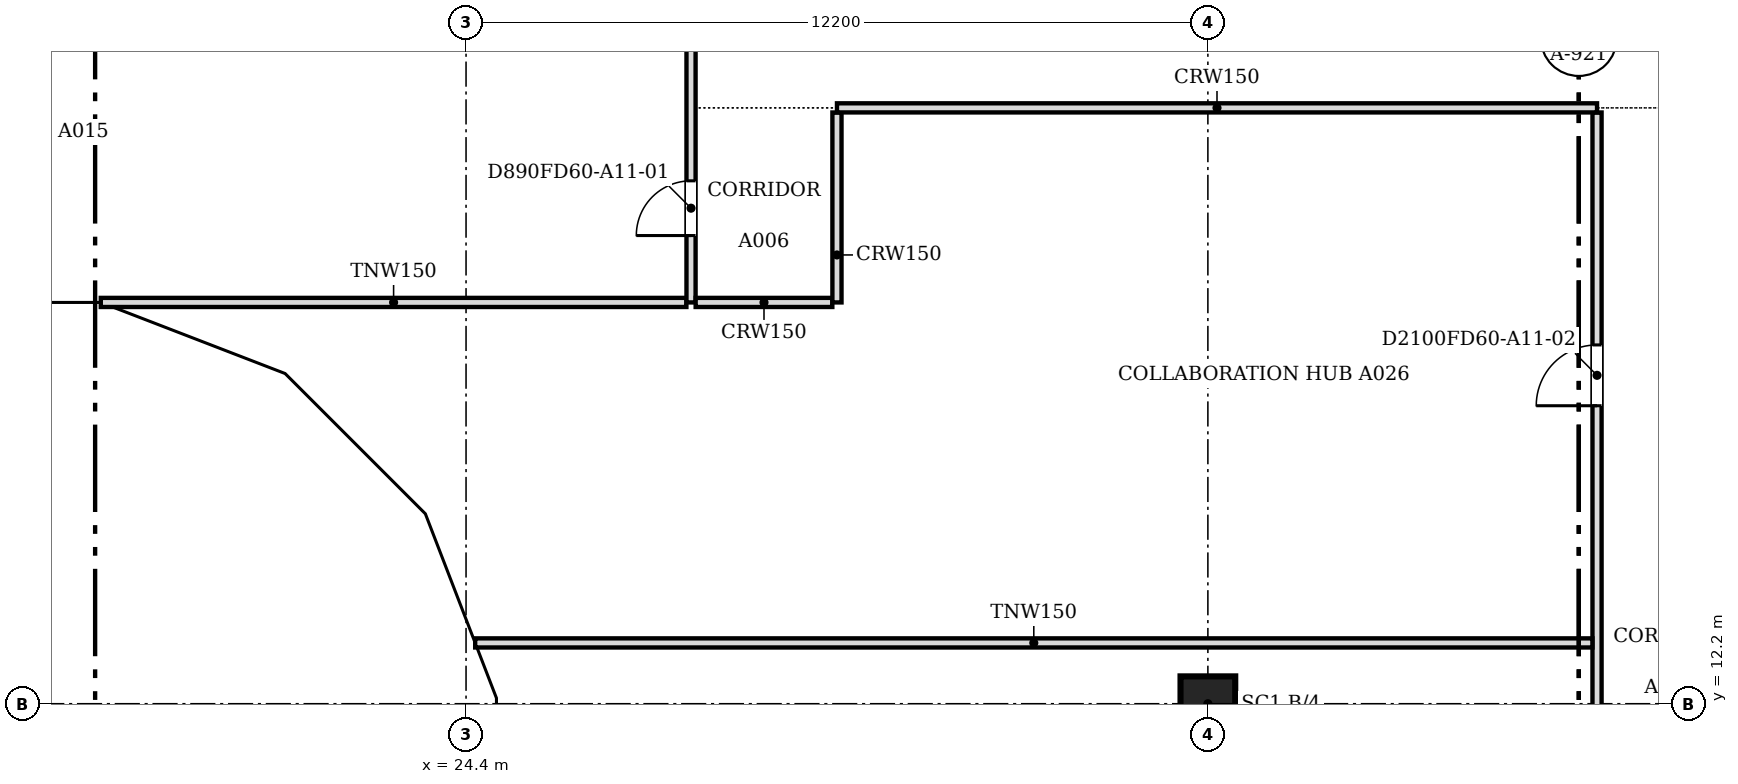
"""IFC4 building model, lengths in metres.
Left out: names, types, materials, properties, quantities, classifications, styles, units other than length and angle.
Written with IfcOpenShell. Run it as: python <this file> out.ifc"""

import sys

from ifc_helpers import new_model, si_unit, direction, frame, frame_2d, origin, origin_2d, place, context, subcontext, project, spatial, polyline, rectangle, outline, extrude, faceted_brep, source, transform, mapped, element, fill, save


model = new_model("IFC4")
c1 = context("Model", 3, precision=1e-05, world=origin(), true_north=direction((0.0, 1.0)))
c2 = subcontext(c1, "Body", "Model", "MODEL_VIEW")
j1 = project(units=[si_unit("LENGTHUNIT", "METRE"), si_unit("PLANEANGLEUNIT", "RADIAN")], contexts=[c1])
p1 = place(None, origin())
s1 = spatial("IfcSite", under=j1, at=p1, CompositionType="ELEMENT")
p2 = place(p1, origin())
s2 = spatial("IfcBuilding", under=s1, at=p2, CompositionType="ELEMENT")
p3 = place(p2, frame((0.0, 0.0, 131.6)))
s3 = spatial("IfcBuildingStorey", under=s2, at=p3, CompositionType="ELEMENT", Elevation=131.6)
p4 = place(p3, frame((36.6, 12.2, 0.0), z_axis=(0.0, 0.0, 1.0), x_axis=(1.0, 0.0, 0.0)))
e1 = element("IfcColumn", 1, at=p4, inside=s3, PredefinedType="COLUMN", context=c2, shape_type="SweptSolid", body=[
    extrude(rectangle(XDim=0.9, YDim=0.9, at=origin_2d()), origin(), (0.0, 0.0, 1.0), 3.6),
])
m1 = source(origin(), c2, "Body", "Brep", [
    faceted_brep([(3.05, -0.25, 0.0), (6.1, -0.25, 3.743), (6.1, -0.25, 3.857), (3.05, -0.25, 7.6), (0.0, -0.25, 3.8), (0.0, 0.25, 3.8), (3.05, 0.25, 7.6), (6.146, 0.25, 3.8), (3.05, 0.25, 0.0), (6.146, -0.0, 3.8)], [[[0, 1, 2, 3, 4]], [[5, 6, 7, 8]], [[8, 7, 9, 1, 0]], [[7, 6, 3, 2, 9]], [[6, 5, 4, 3]], [[5, 8, 0, 4]], [[1, 9, 2]]]),
])
p5 = place(p3, frame((12.2, 18.55, -3.8), z_axis=(0.0, 0.0, 1.0), x_axis=(1.0, 0.0, 0.0)))
e2 = element("IfcWall", 2, at=p5, inside=s3, PredefinedType="SOLIDWALL", context=c2, shape_type="MappedRepresentation", body=[
    mapped(m1, transform((0.0, 0.0, 0.0), scale=1.0)),
])
m2 = source(origin(), c2, "Body", "SweptSolid", [
    extrude(outline(polyline([(3.052, 0.397), (5.824, 3.8), (3.052, 7.202), (0.321, 3.8), (3.052, 0.397)])), frame((0.0, 0.26, 0.0), z_axis=(0.0, -1.0, 0.0), x_axis=(1.0, 0.0, 0.0)), (0.0, 0.0, 1.0), 0.52),
])
p6 = place(p5, origin())
e3 = element("IfcOpeningElement", 3, at=p6, cuts=e2, PredefinedType="OPENING", context=c2, shape_type="MappedRepresentation", body=[
    mapped(m2, transform((0.0, 0.0, 0.0), scale=1.0)),
])
m3 = source(origin(), c2, "Body", "Brep", [
    faceted_brep([(3.096, -0.25, 7.536), (0.047, -0.25, 3.856), (0.047, -0.25, 3.744), (3.096, -0.25, 0.064), (0.0, 0.25, 3.8), (3.149, 0.25, 7.6), (3.202, 0.25, 7.536), (3.202, 0.25, 0.064), (3.149, 0.25, 0.0), (3.149, -0.0, 0.0), (3.149, -0.0, 7.6), (0.0, 0.0, 3.8)], [[[0, 1, 2, 3]], [[4, 5, 6, 7, 8]], [[8, 7, 9]], [[6, 5, 10]], [[5, 4, 11, 1, 0, 10]], [[4, 8, 9, 3, 2, 11]], [[2, 1, 11]], [[3, 9, 7, 6, 10, 0]]]),
])
p7 = place(p3, frame((18.346, 18.55, -3.8), z_axis=(0.0, 0.0, 1.0), x_axis=(0.932985567668, -0.359913782069, 0.0)))
e4 = element("IfcWall", 4, at=p7, inside=s3, PredefinedType="SOLIDWALL", context=c2, shape_type="MappedRepresentation", body=[
    mapped(m3, transform((0.0, 0.0, 0.0), scale=1.0)),
])
m4 = source(origin(), c2, "Body", "SweptSolid", [
    extrude(outline(polyline([(2.949, 6.967), (0.325, 3.8), (2.949, 0.633), (2.949, 6.967)])), frame((0.0, 0.26, 0.0), z_axis=(0.0, -1.0, 0.0), x_axis=(1.0, 0.0, 0.0)), (0.0, 0.0, 1.0), 0.52),
])
p8 = place(p7, origin())
e5 = element("IfcOpeningElement", 5, at=p8, cuts=e4, PredefinedType="OPENING", context=c2, shape_type="MappedRepresentation", body=[
    mapped(m4, transform((0.0, 0.0, 0.0), scale=1.0)),
])
m5 = source(origin(), c2, "Body", "Brep", [
    faceted_brep([(0.106, -0.25, 0.064), (3.156, -0.25, 3.736), (3.156, -0.25, 3.864), (0.106, -0.25, 7.536), (0.0, 0.25, 7.536), (0.053, 0.25, 7.6), (3.209, 0.25, 3.8), (0.053, 0.25, 0.0), (0.0, 0.25, 0.064), (3.209, -0.0, 3.8), (0.053, 0.0, 0.0), (0.053, 0.0, 7.6)], [[[0, 1, 2, 3]], [[4, 5, 6, 7, 8]], [[7, 6, 9, 1, 0, 10]], [[6, 5, 11, 3, 2, 9]], [[5, 4, 11]], [[8, 7, 10]], [[8, 10, 0, 3, 11, 4]], [[1, 9, 2]]]),
])
p9 = place(p3, frame((21.248, 17.454, -3.8), z_axis=(0.0, 0.0, 1.0), x_axis=(0.707106781187, -0.707106781187, 0.0)))
e6 = element("IfcWall", 6, at=p9, inside=s3, PredefinedType="SOLIDWALL", context=c2, shape_type="MappedRepresentation", body=[
    mapped(m5, transform((0.0, 0.0, 0.0), scale=1.0)),
])
m6 = source(origin(), c2, "Body", "SweptSolid", [
    extrude(outline(polyline([(0.253, 0.632), (2.884, 3.8), (0.253, 6.968), (0.253, 0.632)])), frame((0.0, 0.26, 0.0), z_axis=(0.0, -1.0, 0.0), x_axis=(1.0, 0.0, 0.0)), (0.0, 0.0, 1.0), 0.52),
])
p10 = place(p9, origin())
e7 = element("IfcOpeningElement", 7, at=p10, cuts=e6, PredefinedType="OPENING", context=c2, shape_type="MappedRepresentation", body=[
    mapped(m6, transform((0.0, 0.0, 0.0), scale=1.0)),
])
m7 = source(origin(), c2, "Body", "Brep", [
    faceted_brep([(3.103, -0.25, 7.544), (0.053, -0.25, 3.864), (0.053, -0.25, 3.736), (3.103, -0.25, 0.056), (0.0, 0.25, 3.8), (3.149, 0.25, 7.6), (3.196, 0.25, 7.543), (3.196, 0.25, 0.057), (3.149, 0.25, 0.0), (3.149, -0.0, 0.0), (3.149, -0.0, 7.6), (0.0, 0.0, 3.8)], [[[0, 1, 2, 3]], [[4, 5, 6, 7, 8]], [[8, 7, 9]], [[6, 5, 10]], [[5, 4, 11, 1, 0, 10]], [[4, 8, 9, 3, 2, 11]], [[2, 1, 11]], [[3, 9, 7, 6, 10, 0]]]),
])
p11 = place(p3, frame((23.517, 15.185, -3.8), z_axis=(0.0, 0.0, 1.0), x_axis=(0.359864468756, -0.933004589553, 0.0)))
e8 = element("IfcWall", 8, at=p11, inside=s3, PredefinedType="SOLIDWALL", context=c2, shape_type="MappedRepresentation", body=[
    mapped(m7, transform((0.0, 0.0, 0.0), scale=1.0)),
])
p12 = place(p11, origin())
e9 = element("IfcOpeningElement", 9, at=p12, cuts=e8, PredefinedType="OPENING", context=c2, shape_type="MappedRepresentation", body=[
    mapped(m4, transform((0.0, 0.0, 0.0), scale=1.0)),
])
m8 = source(origin(), c2, "Body", "Brep", [
    faceted_brep([(0.093, -0.25, 0.057), (3.143, -0.25, 3.8), (0.093, -0.25, 7.543), (0.0, 0.25, 7.544), (0.047, 0.25, 7.6), (3.143, 0.25, 3.8), (0.047, 0.25, 0.0), (0.0, 0.25, 0.056), (0.047, 0.0, 0.0), (0.047, 0.0, 7.6)], [[[0, 1, 2]], [[3, 4, 5, 6, 7]], [[6, 5, 1, 0, 8]], [[5, 4, 9, 2, 1]], [[4, 3, 9]], [[7, 6, 8]], [[7, 8, 0, 2, 9, 3]]]),
])
p13 = place(p3, frame((24.65, 12.293, -3.8), z_axis=(0.0, 0.0, 1.0), x_axis=(0.0, -1.0, 0.0)))
e10 = element("IfcWall", 10, at=p13, inside=s3, PredefinedType="SOLIDWALL", context=c2, shape_type="MappedRepresentation", body=[
    mapped(m8, transform((0.0, 0.0, 0.0), scale=1.0)),
])
m9 = source(origin(), c2, "Body", "SweptSolid", [
    extrude(outline(polyline([(0.247, 0.641), (2.821, 3.8), (0.247, 6.959), (0.247, 0.641)])), frame((0.0, 0.26, 0.0), z_axis=(0.0, -1.0, 0.0), x_axis=(1.0, 0.0, 0.0)), (0.0, 0.0, 1.0), 0.52),
])
p14 = place(p13, origin())
e11 = element("IfcOpeningElement", 11, at=p14, cuts=e10, PredefinedType="OPENING", context=c2, shape_type="MappedRepresentation", body=[
    mapped(m9, transform((0.0, 0.0, 0.0), scale=1.0)),
])
p15 = place(p2, frame((0.0, 0.0, 135.4)))
s4 = spatial("IfcBuildingStorey", under=s2, at=p15, CompositionType="ELEMENT", Elevation=135.4)
m10 = source(origin(), c2, "Body", "Brep", [
    faceted_brep([(3.05, -0.25, 7.543), (0.0, -0.25, 3.8), (3.05, -0.25, 0.057), (0.0, 0.25, 3.8), (3.096, 0.25, 7.6), (3.143, 0.25, 7.543), (3.143, 0.25, 0.056), (3.096, 0.25, 0.0), (3.096, -0.0, 0.0), (3.096, -0.0, 7.6)], [[[0, 1, 2]], [[3, 4, 5, 6, 7]], [[7, 6, 8]], [[5, 4, 9]], [[4, 3, 1, 0, 9]], [[3, 7, 8, 2, 1]], [[2, 8, 6, 5, 9, 0]]]),
])
p16 = place(p15, frame((15.25, 18.55, -3.8), z_axis=(0.0, 0.0, 1.0), x_axis=(1.0, 0.0, 0.0)))
e12 = element("IfcWall", 12, at=p16, inside=s4, PredefinedType="SOLIDWALL", context=c2, shape_type="MappedRepresentation", body=[
    mapped(m10, transform((0.0, 0.0, 0.0), scale=1.0)),
])
m11 = source(origin(), c2, "Body", "SweptSolid", [
    extrude(outline(polyline([(2.896, 6.959), (0.323, 3.8), (2.896, 0.641), (2.896, 6.959)])), frame((0.0, 0.26, 0.0), z_axis=(0.0, -1.0, 0.0), x_axis=(1.0, 0.0, 0.0)), (0.0, 0.0, 1.0), 0.52),
])
p17 = place(p16, origin())
e13 = element("IfcOpeningElement", 13, at=p17, cuts=e12, PredefinedType="OPENING", context=c2, shape_type="MappedRepresentation", body=[
    mapped(m11, transform((0.0, 0.0, 0.0), scale=1.0)),
])
m12 = source(origin(), c2, "Body", "Brep", [
    faceted_brep([(0.093, -0.25, 0.056), (3.143, -0.25, 3.736), (3.143, -0.25, 3.864), (0.093, -0.25, 7.544), (0.0, 0.25, 7.543), (0.047, 0.25, 7.6), (3.196, 0.25, 3.8), (0.047, 0.25, 0.0), (0.0, 0.25, 0.057), (3.196, -0.0, 3.8), (0.047, 0.0, 0.0), (0.047, 0.0, 7.6)], [[[0, 1, 2, 3]], [[4, 5, 6, 7, 8]], [[7, 6, 9, 1, 0, 10]], [[6, 5, 11, 3, 2, 9]], [[5, 4, 11]], [[8, 7, 10]], [[8, 10, 0, 3, 11, 4]], [[1, 9, 2]]]),
])
p18 = place(p15, frame((18.303, 18.567, -3.8), z_axis=(0.0, 0.0, 1.0), x_axis=(0.932978940178, -0.359930961693, 0.0)))
e14 = element("IfcWall", 14, at=p18, inside=s4, PredefinedType="SOLIDWALL", context=c2, shape_type="MappedRepresentation", body=[
    mapped(m12, transform((0.0, 0.0, 0.0), scale=1.0)),
])
m13 = source(origin(), c2, "Body", "SweptSolid", [
    extrude(outline(polyline([(0.247, 0.633), (2.871, 3.8), (0.247, 6.967), (0.247, 0.633)])), frame((0.0, 0.26, 0.0), z_axis=(0.0, -1.0, 0.0), x_axis=(1.0, 0.0, 0.0)), (0.0, 0.0, 1.0), 0.52),
])
p19 = place(p18, origin())
e15 = element("IfcOpeningElement", 15, at=p19, cuts=e14, PredefinedType="OPENING", context=c2, shape_type="MappedRepresentation", body=[
    mapped(m13, transform((0.0, 0.0, 0.0), scale=1.0)),
])
m14 = source(origin(), c2, "Body", "Brep", [
    faceted_brep([(3.103, -0.25, 7.536), (0.053, -0.25, 3.864), (0.053, -0.25, 3.736), (3.103, -0.25, 0.064), (0.0, 0.25, 3.8), (3.156, 0.25, 7.6), (3.209, 0.25, 7.536), (3.209, 0.25, 0.064), (3.156, 0.25, 0.0), (3.156, -0.0, 0.0), (3.156, -0.0, 7.6), (0.0, 0.0, 3.8)], [[[0, 1, 2, 3]], [[4, 5, 6, 7, 8]], [[8, 7, 9]], [[6, 5, 10]], [[5, 4, 11, 1, 0, 10]], [[4, 8, 9, 3, 2, 11]], [[11, 2, 1]], [[3, 9, 7, 6, 10, 0]]]),
])
p20 = place(p15, frame((21.285, 17.417, -3.8), z_axis=(0.0, 0.0, 1.0), x_axis=(0.707106781187, -0.707106781187, 0.0)))
e16 = element("IfcWall", 16, at=p20, inside=s4, PredefinedType="SOLIDWALL", context=c2, shape_type="MappedRepresentation", body=[
    mapped(m14, transform((0.0, 0.0, 0.0), scale=1.0)),
])
m15 = source(origin(), c2, "Body", "SweptSolid", [
    extrude(outline(polyline([(2.956, 6.968), (0.325, 3.8), (2.956, 0.632), (2.956, 6.968)])), frame((0.0, 0.26, 0.0), z_axis=(0.0, -1.0, 0.0), x_axis=(1.0, 0.0, 0.0)), (0.0, 0.0, 1.0), 0.52),
])
p21 = place(p20, origin())
e17 = element("IfcOpeningElement", 17, at=p21, cuts=e16, PredefinedType="OPENING", context=c2, shape_type="MappedRepresentation", body=[
    mapped(m15, transform((0.0, 0.0, 0.0), scale=1.0)),
])
m16 = source(origin(), c2, "Body", "Brep", [
    faceted_brep([(0.106, -0.25, 0.064), (3.156, -0.25, 3.744), (3.156, -0.25, 3.856), (0.106, -0.25, 7.536), (0.0, 0.25, 7.536), (0.053, 0.25, 7.6), (3.202, 0.25, 3.8), (0.053, 0.25, 0.0), (0.0, 0.25, 0.064), (3.202, -0.0, 3.8), (0.053, 0.0, 0.0), (0.053, 0.0, 7.6)], [[[0, 1, 2, 3]], [[4, 5, 6, 7, 8]], [[7, 6, 9, 1, 0, 10]], [[6, 5, 11, 3, 2, 9]], [[5, 4, 11]], [[8, 7, 10]], [[8, 10, 0, 3, 11, 4]], [[1, 9, 2]]]),
])
p22 = place(p15, frame((23.497, 15.234, -3.8), z_axis=(0.0, 0.0, 1.0), x_axis=(0.359913782069, -0.932985567668, 0.0)))
e18 = element("IfcWall", 18, at=p22, inside=s4, PredefinedType="SOLIDWALL", context=c2, shape_type="MappedRepresentation", body=[
    mapped(m16, transform((0.0, 0.0, 0.0), scale=1.0)),
])
m17 = source(origin(), c2, "Body", "SweptSolid", [
    extrude(outline(polyline([(0.253, 0.633), (2.878, 3.8), (0.253, 6.967), (0.253, 0.633)])), frame((0.0, 0.26, 0.0), z_axis=(0.0, -1.0, 0.0), x_axis=(1.0, 0.0, 0.0)), (0.0, 0.0, 1.0), 0.52),
])
p23 = place(p22, origin())
e19 = element("IfcOpeningElement", 19, at=p23, cuts=e18, PredefinedType="OPENING", context=c2, shape_type="MappedRepresentation", body=[
    mapped(m17, transform((0.0, 0.0, 0.0), scale=1.0)),
])
m18 = source(origin(), c2, "Body", "Brep", [
    faceted_brep([(3.096, -0.25, 0.0), (6.1, -0.25, 3.8), (3.096, -0.25, 7.6), (0.047, -0.25, 3.857), (0.047, -0.25, 3.743), (0.0, 0.25, 3.8), (3.096, 0.25, 7.6), (6.053, 0.25, 3.859), (6.053, 0.25, 3.741), (3.096, 0.25, 0.0), (6.1, -0.0, 3.8), (0.0, 0.0, 3.8)], [[[0, 1, 2, 3, 4]], [[5, 6, 7, 8, 9]], [[9, 8, 10, 1, 0]], [[7, 6, 2, 1, 10]], [[6, 5, 11, 3, 2]], [[5, 9, 0, 4, 11]], [[11, 4, 3]], [[10, 8, 7]]]),
])
p24 = place(p15, frame((24.65, 12.247, -3.8), z_axis=(0.0, 0.0, 1.0), x_axis=(0.0, -1.0, 0.0)))
e20 = element("IfcWall", 20, at=p24, inside=s4, PredefinedType="SOLIDWALL", context=c2, shape_type="MappedRepresentation", body=[
    mapped(m18, transform((0.0, 0.0, 0.0), scale=1.0)),
])
m19 = source(origin(), c2, "Body", "SweptSolid", [
    extrude(outline(polyline([(3.094, 0.399), (5.781, 3.8), (3.094, 7.2), (0.323, 3.8), (3.094, 0.399)])), frame((0.0, 0.26, 0.0), z_axis=(0.0, -1.0, 0.0), x_axis=(1.0, 0.0, 0.0)), (0.0, 0.0, 1.0), 0.52),
])
p25 = place(p24, origin())
e21 = element("IfcOpeningElement", 21, at=p25, cuts=e20, PredefinedType="OPENING", context=c2, shape_type="MappedRepresentation", body=[
    mapped(m19, transform((0.0, 0.0, 0.0), scale=1.0)),
])
p26 = place(p3, frame((43.0, 0.5, 0.0), z_axis=(0.0, 0.0, 1.0), x_axis=(0.0, 1.0, 0.0)))
e22 = element("IfcWall", 22, at=p26, inside=s3, PredefinedType="PARTITIONING", context=c2, shape_type="SweptSolid", body=[
    extrude(rectangle(XDim=21.424, YDim=0.15, at=frame_2d((10.712, 0.0))), origin(), (0.0, 0.0, 1.0), 3.067),
])
m20 = source(origin(), c2, "Body", "SweptSolid", [
    extrude(rectangle(XDim=1.0, YDim=2.1, at=frame_2d((0.5, 1.05))), frame((0.0, 0.085, 0.0), z_axis=(0.0, -1.0, 0.0), x_axis=(1.0, 0.0, 0.0)), (0.0, 0.0, 1.0), 0.17),
])
p27 = place(p26, frame((16.601, 0.0, 0.0)))
e23 = element("IfcOpeningElement", 23, at=p27, cuts=e22, PredefinedType="OPENING", context=c2, shape_type="MappedRepresentation", body=[
    mapped(m20, transform((0.0, 0.0, 0.0), scale=1.0)),
])
p28 = place(p26, frame((7.7, 0.0, 0.0)))
e24 = element("IfcOpeningElement", 24, at=p28, cuts=e22, PredefinedType="OPENING", context=c2, shape_type="MappedRepresentation", body=[
    mapped(m20, transform((0.0, 0.0, 0.0), scale=1.0)),
])
p29 = place(p3, frame((24.55, 13.2, 0.0), z_axis=(0.0, 0.0, 1.0), x_axis=(1.0, 0.0, 0.0)))
e25 = element("IfcWall", 25, at=p29, inside=s3, PredefinedType="PARTITIONING", context=c2, shape_type="SweptSolid", body=[
    extrude(rectangle(XDim=18.374, YDim=0.15, at=frame_2d((9.187, 0.0))), origin(), (0.0, 0.0, 1.0), 3.067),
])
p30 = place(p3, frame((18.393, 18.8, 0.0), z_axis=(0.0, 0.0, 1.0), x_axis=(1.0, 0.0, 0.0)))
e26 = element("IfcWall", 26, at=p30, inside=s3, PredefinedType="PARTITIONING", context=c2, shape_type="SweptSolid", body=[
    extrude(rectangle(XDim=9.631, YDim=0.15, at=frame_2d((4.815, 0.0))), origin(), (0.0, 0.0, 1.0), 3.067),
])
p31 = place(p3, frame((28.1, 18.8, 0.0), z_axis=(0.0, 0.0, 1.0), x_axis=(0.0, 1.0, 0.0)))
e27 = element("IfcWall", 27, at=p31, inside=s3, PredefinedType="PARTITIONING", context=c2, shape_type="SweptSolid", body=[
    extrude(rectangle(XDim=26.5, YDim=0.15, at=frame_2d((13.25, 0.0))), origin(), (0.0, 0.0, 1.0), 3.067),
])
m21 = source(origin(), c2, "Body", "SweptSolid", [
    extrude(rectangle(XDim=0.9, YDim=2.1, at=frame_2d((0.45, 1.05))), frame((0.0, 0.085, 0.0), z_axis=(0.0, -1.0, 0.0), x_axis=(1.0, 0.0, 0.0)), (0.0, 0.0, 1.0), 0.17),
])
p32 = place(p31, frame((1.1, 0.0, 0.0)))
e28 = element("IfcOpeningElement", 28, at=p32, cuts=e27, PredefinedType="OPENING", context=c2, shape_type="MappedRepresentation", body=[
    mapped(m21, transform((0.0, 0.0, 0.0), scale=1.0)),
])
p33 = place(p31, frame((9.7, 0.0, 0.0)))
e29 = element("IfcOpeningElement", 29, at=p33, cuts=e27, PredefinedType="OPENING", context=c2, shape_type="MappedRepresentation", body=[
    mapped(m21, transform((0.0, 0.0, 0.0), scale=1.0)),
])
p34 = place(p31, frame((20.15, 0.0, 0.0)))
e30 = element("IfcOpeningElement", 30, at=p34, cuts=e27, PredefinedType="OPENING", context=c2, shape_type="MappedRepresentation", body=[
    mapped(m21, transform((0.0, 0.0, 0.0), scale=1.0)),
])
p35 = place(p3, frame((28.176, 18.8, 0.0), z_axis=(0.0, 0.0, 1.0), x_axis=(1.0, 0.0, 0.0)))
e31 = element("IfcWall", 31, at=p35, inside=s3, PredefinedType="PARTITIONING", context=c2, shape_type="SweptSolid", body=[
    extrude(rectangle(XDim=2.248, YDim=0.15, at=frame_2d((1.124, 0.0))), origin(), (0.0, 0.0, 1.0), 3.067),
])
p36 = place(p3, frame((30.5, 18.8, 0.0), z_axis=(0.0, 0.0, 1.0), x_axis=(0.0, 1.0, 0.0)))
e32 = element("IfcWall", 32, at=p36, inside=s3, PredefinedType="PARTITIONING", context=c2, shape_type="SweptSolid", body=[
    extrude(rectangle(XDim=3.124, YDim=0.15, at=frame_2d((1.562, 0.0))), origin(), (0.0, 0.0, 1.0), 3.067),
])
p37 = place(p3, frame((30.5, 22.0, 0.0), z_axis=(0.0, 0.0, 1.0), x_axis=(1.0, 0.0, 0.0)))
e33 = element("IfcWall", 33, at=p37, inside=s3, PredefinedType="PARTITIONING", context=c2, shape_type="SweptSolid", body=[
    extrude(rectangle(XDim=12.5, YDim=0.15, at=frame_2d((6.25, 0.0))), origin(), (0.0, 0.0, 1.0), 3.067),
])
m22 = source(origin(), c2, "Body", "SweptSolid", [
    extrude(rectangle(XDim=0.9, YDim=2.1, at=frame_2d((0.45, 1.05))), frame((0.0, 0.025, 0.0), z_axis=(0.0, -1.0, 0.0), x_axis=(1.0, 0.0, 0.0)), (0.0, 0.0, 1.0), 0.05),
])
p38 = place(p32, origin())
e34 = element("IfcDoor", 34, at=p38, inside=s3, OperationType="SINGLE_SWING_LEFT", PredefinedType="DOOR", context=c2, shape_type="MappedRepresentation", body=[
    mapped(m22, transform((0.0, 0.0, 0.0), scale=1.0)),
])
fill(e28, e34)
m23 = source(origin(), c2, "Body", "SweptSolid", [
    extrude(rectangle(XDim=1.0, YDim=2.1, at=frame_2d((0.5, 1.05))), frame((0.0, 0.025, 0.0), z_axis=(0.0, -1.0, 0.0), x_axis=(1.0, 0.0, 0.0)), (0.0, 0.0, 1.0), 0.05),
])
p39 = place(p27, origin())
e35 = element("IfcDoor", 35, at=p39, inside=s3, OperationType="SINGLE_SWING_LEFT", PredefinedType="DOOR", context=c2, shape_type="MappedRepresentation", body=[
    mapped(m23, transform((0.0, 0.0, 0.0), scale=1.0)),
])
fill(e23, e35)
save(model, sys.argv[1])
